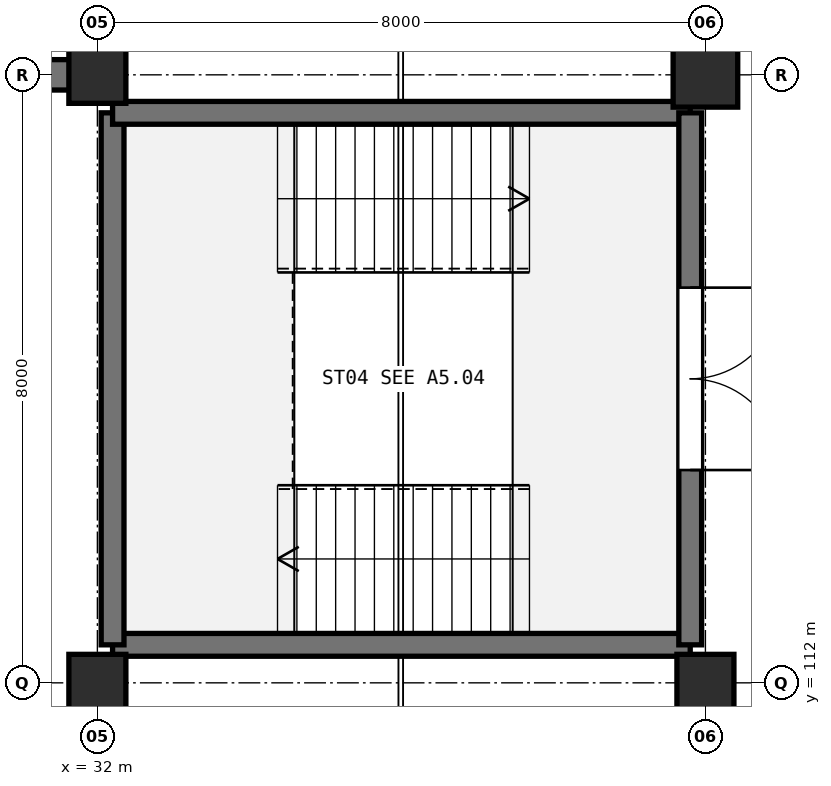
"""IFC4 building model, lengths in metres.
Left out: names, types, materials, properties, quantities, classifications, styles, units other than length and angle.
Written with IfcOpenShell. Run it as: python <this file> out.ifc"""

import sys

from ifc_helpers import new_model, si_unit, direction, frame, frame_2d, origin, origin_2d, place, context, subcontext, project, spatial, rectangle, extrude, element, fill, save


model = new_model("IFC4")
c1 = context("Model", 3, precision=1e-05, world=origin(), true_north=direction((0.0, 1.0)))
c2 = subcontext(c1, "Body", "Model", "MODEL_VIEW")
j1 = project(units=[si_unit("LENGTHUNIT", "METRE"), si_unit("PLANEANGLEUNIT", "RADIAN")], contexts=[c1])
p1 = place(None, origin())
s1 = spatial("IfcSite", under=j1, at=p1, CompositionType="ELEMENT")
p2 = place(p1, origin())
s2 = spatial("IfcBuilding", under=s1, at=p2, CompositionType="ELEMENT")
p3 = place(p2, frame((0.0, 0.0, -4.8)))
s3 = spatial("IfcBuildingStorey", under=s2, at=p3, CompositionType="ELEMENT", Elevation=-4.8)
for number, where, z_axis, x_axis in (
    (1, (32.0, 112.0, 0.0), (0.0, 0.0, 1.0), (1.0, 0.0, 0.0)),
    (2, (32.0, 120.0, 0.0), (0.0, 0.0, 1.0), (1.0, 0.0, 0.0)),
    (3, (40.0, 112.0, 0.0), (0.0, 0.0, 1.0), (1.0, 0.0, 0.0)),
):
    element("IfcColumn", number, at=place(p3, frame(where, z_axis=z_axis, x_axis=x_axis)), inside=s3, PredefinedType="COLUMN", context=c2, shape_type="SweptSolid", body=[
        extrude(rectangle(XDim=0.75, YDim=0.75, at=origin_2d()), origin(), (0.0, 0.0, 1.0), 4.8),
    ])
p4 = place(p3, frame((40.0, 120.0, 0.0), z_axis=(0.0, 0.0, 1.0), x_axis=(1.0, 0.0, 0.0)))
e4 = element("IfcColumn", 4, at=p4, inside=s3, PredefinedType="COLUMN", context=c2, shape_type="SweptSolid", body=[
    extrude(rectangle(XDim=0.85, YDim=0.85, at=origin_2d()), origin(), (0.0, 0.0, 1.0), 4.8),
])
p5 = place(p3, frame((24.355, 120.0, 0.0), z_axis=(0.0, 0.0, 1.0), x_axis=(1.0, 0.0, 0.0)))
e5 = element("IfcWall", 5, at=p5, inside=s3, PredefinedType="USERDEFINED", context=c2, shape_type="SweptSolid", body=[
    extrude(rectangle(XDim=7.29, YDim=0.4, at=frame_2d((3.645, 0.0))), origin(), (0.0, 0.0, 1.0), 4.46),
])
p6 = place(p3, frame((39.8, 112.5, 0.0), z_axis=(0.0, 0.0, 1.0), x_axis=(-1.0, 0.0, 0.0)))
e6 = element("IfcWall", 6, at=p6, inside=s3, PredefinedType="SHEAR", context=c2, shape_type="SweptSolid", body=[
    extrude(rectangle(XDim=7.6, YDim=0.3, at=frame_2d((3.8, 0.0))), origin(), (0.0, 0.0, 1.0), 4.46),
])
p7 = place(p3, frame((32.2, 112.5, 0.0), z_axis=(0.0, 0.0, 1.0), x_axis=(0.0, 1.0, 0.0)))
e7 = element("IfcWall", 7, at=p7, inside=s3, PredefinedType="SHEAR", context=c2, shape_type="SweptSolid", body=[
    extrude(rectangle(XDim=7.0, YDim=0.3, at=frame_2d((3.5, 0.0))), origin(), (0.0, 0.0, 1.0), 4.46),
])
p8 = place(p3, frame((32.2, 119.5, 0.0), z_axis=(0.0, 0.0, 1.0), x_axis=(1.0, 0.0, 0.0)))
e8 = element("IfcWall", 8, at=p8, inside=s3, PredefinedType="SHEAR", context=c2, shape_type="SweptSolid", body=[
    extrude(rectangle(XDim=7.6, YDim=0.3, at=frame_2d((3.8, 0.0))), origin(), (0.0, 0.0, 1.0), 4.46),
])
p9 = place(p3, frame((39.8, 119.5, 0.0), z_axis=(0.0, 0.0, 1.0), x_axis=(0.0, -1.0, 0.0)))
e9 = element("IfcWall", 9, at=p9, inside=s3, PredefinedType="SHEAR", context=c2, shape_type="SweptSolid", body=[
    extrude(rectangle(XDim=7.0, YDim=0.3, at=frame_2d((3.5, 0.0))), origin(), (0.0, 0.0, 1.0), 4.46),
])
p10 = place(p9, frame((2.3, 0.0, 0.0)))
e10 = element("IfcOpeningElement", 10, at=p10, cuts=e9, PredefinedType="OPENING", context=c2, shape_type="SweptSolid", body=[
    extrude(rectangle(XDim=2.4, YDim=2.2, at=frame_2d((1.2, 1.1))), frame((0.0, 0.16, 0.0), z_axis=(0.0, -1.0, 0.0), x_axis=(1.0, 0.0, 0.0)), (0.0, 0.0, 1.0), 0.32),
])
p11 = place(p10, frame((2.4, 0.0, 0.0), z_axis=(0.0, 0.0, 1.0), x_axis=(-1.0, 0.0, 0.0)))
e11 = element("IfcDoor", 11, at=p11, inside=s3, OperationType="DOUBLE_DOOR_SINGLE_SWING", PredefinedType="DOOR", context=c2, shape_type="SweptSolid", body=[
    extrude(rectangle(XDim=2.4, YDim=2.2, at=frame_2d((1.2, 1.1))), frame((0.0, 0.025, 0.0), z_axis=(0.0, -1.0, 0.0), x_axis=(1.0, 0.0, 0.0)), (0.0, 0.0, 1.0), 0.05),
])
fill(e10, e11)
save(model, sys.argv[1])
